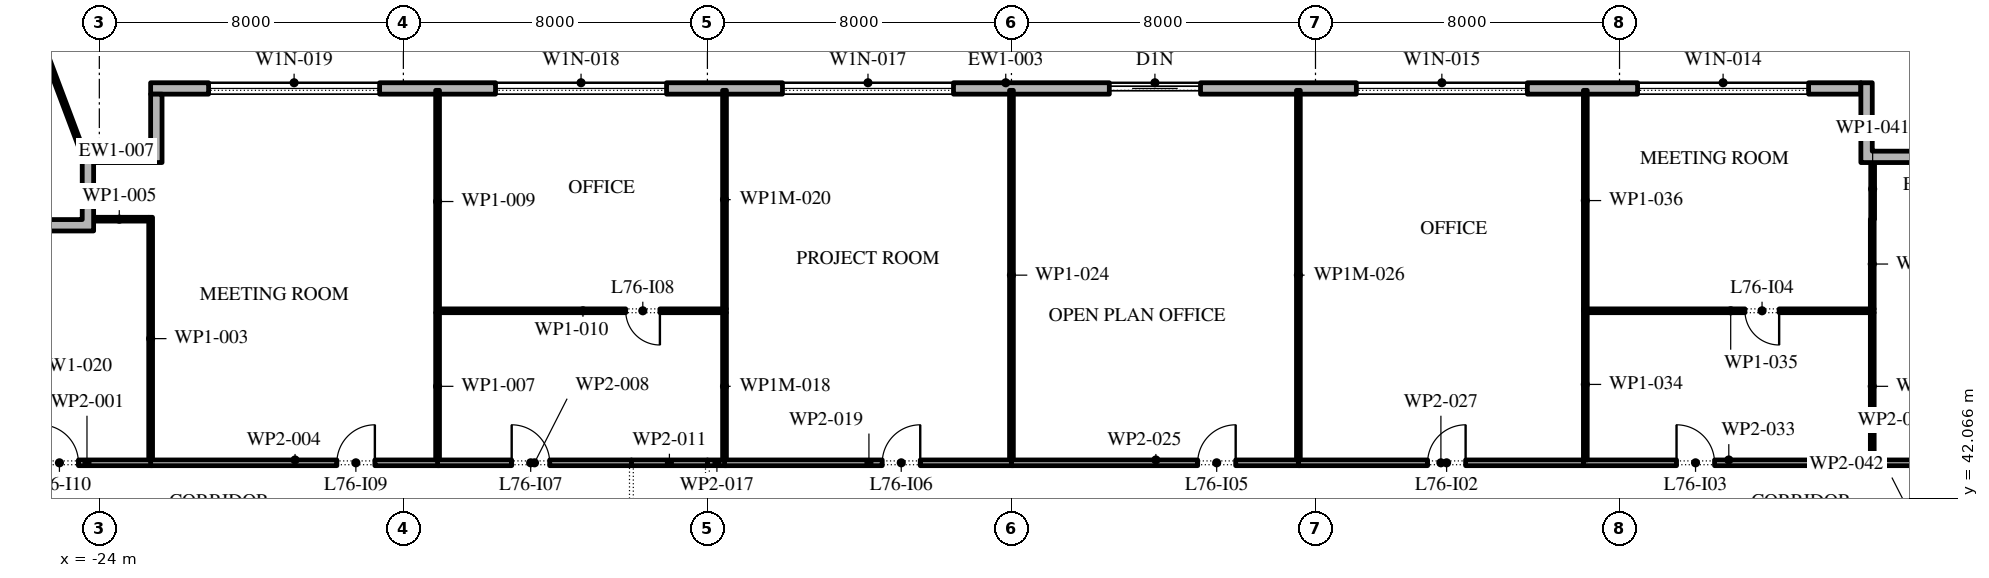
"""IFC4 building model, lengths in metres.
Left out: names, types, materials, properties, quantities, classifications, styles, units other than length and angle.
Written with IfcOpenShell. Run it as: python <this file> out.ifc"""

import sys

from ifc_helpers import new_model, si_unit, direction, frame, frame_2d, origin, place, context, subcontext, project, spatial, polyline, rectangle, outline, extrude, element, fill, save


model = new_model("IFC4")
c1 = context("Model", 3, precision=1e-05, world=origin(), true_north=direction((0.0, 1.0)))
c2 = subcontext(c1, "Body", "Model", "MODEL_VIEW")
j1 = project(units=[si_unit("LENGTHUNIT", "METRE"), si_unit("PLANEANGLEUNIT", "RADIAN")], contexts=[c1])
p1 = place(None, origin())
s1 = spatial("IfcSite", under=j1, at=p1, CompositionType="ELEMENT")
p2 = place(p1, origin())
s2 = spatial("IfcBuilding", under=s1, at=p2, CompositionType="ELEMENT")
p3 = place(p2, frame((0.0, 0.0, 346.8)))
s3 = spatial("IfcBuildingStorey", under=s2, at=p3, CompositionType="ELEMENT", Elevation=346.8)
p4 = place(p3, frame((22.35, 52.85, 0.0), z_axis=(0.0, 0.0, 1.0), x_axis=(-1.0, 0.0, 0.0)))
e1 = element("IfcWall", 1, at=p4, inside=s3, PredefinedType="STANDARD", context=c2, shape_type="SweptSolid", body=[
    extrude(rectangle(XDim=45.0, YDim=0.3, at=frame_2d((22.5, 0.0))), origin(), (0.0, 0.0, 1.0), 4.0),
])
p5 = place(p4, frame((1.375, 0.0, 0.45)))
e2 = element("IfcOpeningElement", 2, at=p5, cuts=e1, PredefinedType="OPENING", context=c2, shape_type="SweptSolid", body=[
    extrude(rectangle(XDim=4.5, YDim=2.525, at=frame_2d((2.25, 1.262))), frame((0.0, 0.16, 0.0), z_axis=(0.0, -1.0, 0.0), x_axis=(1.0, 0.0, 0.0)), (0.0, 0.0, 1.0), 0.32),
])
p6 = place(p4, frame((8.775, 0.0, 0.45)))
e3 = element("IfcOpeningElement", 3, at=p6, cuts=e1, PredefinedType="OPENING", context=c2, shape_type="SweptSolid", body=[
    extrude(rectangle(XDim=4.5, YDim=2.525, at=frame_2d((2.25, 1.262))), frame((0.0, 0.16, 0.0), z_axis=(0.0, -1.0, 0.0), x_axis=(1.0, 0.0, 0.0)), (0.0, 0.0, 1.0), 0.32),
])
p7 = place(p4, frame((17.375, 0.0, 0.0)))
e4 = element("IfcOpeningElement", 4, at=p7, cuts=e1, PredefinedType="OPENING", context=c2, shape_type="SweptSolid", body=[
    extrude(rectangle(XDim=2.4, YDim=2.975, at=frame_2d((1.2, 1.488))), frame((0.0, 0.16, 0.0), z_axis=(0.0, -1.0, 0.0), x_axis=(1.0, 0.0, 0.0)), (0.0, 0.0, 1.0), 0.32),
])
p8 = place(p4, frame((23.875, 0.0, 0.45)))
e5 = element("IfcOpeningElement", 5, at=p8, cuts=e1, PredefinedType="OPENING", context=c2, shape_type="SweptSolid", body=[
    extrude(rectangle(XDim=4.5, YDim=2.525, at=frame_2d((2.25, 1.262))), frame((0.0, 0.16, 0.0), z_axis=(0.0, -1.0, 0.0), x_axis=(1.0, 0.0, 0.0)), (0.0, 0.0, 1.0), 0.32),
])
p9 = place(p4, frame((31.425, 0.0, 0.45)))
e6 = element("IfcOpeningElement", 6, at=p9, cuts=e1, PredefinedType="OPENING", context=c2, shape_type="SweptSolid", body=[
    extrude(rectangle(XDim=4.5, YDim=2.525, at=frame_2d((2.25, 1.262))), frame((0.0, 0.16, 0.0), z_axis=(0.0, -1.0, 0.0), x_axis=(1.0, 0.0, 0.0)), (0.0, 0.0, 1.0), 0.32),
])
p10 = place(p4, frame((38.975, 0.0, 0.45)))
e7 = element("IfcOpeningElement", 7, at=p10, cuts=e1, PredefinedType="OPENING", context=c2, shape_type="SweptSolid", body=[
    extrude(rectangle(XDim=4.5, YDim=2.525, at=frame_2d((2.25, 1.262))), frame((0.0, 0.16, 0.0), z_axis=(0.0, -1.0, 0.0), x_axis=(1.0, 0.0, 0.0)), (0.0, 0.0, 1.0), 0.32),
])
p11 = place(p3, origin())
e8 = element("IfcWall", 8, at=p11, inside=s3, PredefinedType="STANDARD", context=c2, shape_type="SweptSolid", body=[
    extrude(outline(polyline([(24.15, 50.9), (22.35, 50.9), (22.35, 53.0), (22.65, 53.0), (22.65, 51.2), (24.45, 51.2), (24.45, 49.4), (25.95, 49.4), (25.95, 49.1), (24.15, 49.1), (24.15, 50.9)])), origin(), (0.0, 0.0, 1.0), 4.0),
])
p12 = place(p3, origin())
e9 = element("IfcWall", 9, at=p12, inside=s3, PredefinedType="STANDARD", context=c2, shape_type="SweptSolid", body=[
    extrude(outline(polyline([(-24.45, 49.4), (-24.45, 51.2), (-22.65, 51.2), (-22.65, 52.7), (-22.35, 52.7), (-22.35, 50.9), (-24.15, 50.9), (-24.15, 49.1), (-26.25, 49.1), (-26.25, 49.4), (-24.45, 49.4)])), origin(), (0.0, 0.0, 1.0), 4.0),
])
p13 = place(p3, frame((-24.45, 51.2, -0.05), z_axis=(0.0, 0.0, 1.0), x_axis=(-0.352001800812, 0.93599932277, 0.0)))
e10 = element("IfcWall", 10, at=p13, inside=s3, PredefinedType="STANDARD", context=c2, shape_type="SweptSolid", body=[
    extrude(rectangle(XDim=6.091, YDim=0.1, at=frame_2d((3.045, 0.0))), origin(), (0.0, 0.0, 1.0), 4.05),
])
p14 = place(p3, frame((-26.05, 43.0, 0.0), z_axis=(0.0, 0.0, 1.0), x_axis=(1.0, 0.0, 0.0)))
e11 = element("IfcWall", 11, at=p14, inside=s3, PredefinedType="PARTITIONING", context=c2, shape_type="SweptSolid", body=[
    extrude(rectangle(XDim=3.45, YDim=0.15, at=frame_2d((1.725, 0.0))), origin(), (0.0, 0.0, 1.0), 4.0),
])
p15 = place(p14, frame((0.5, 0.0, 0.0)))
e12 = element("IfcOpeningElement", 12, at=p15, cuts=e11, PredefinedType="OPENING", context=c2, shape_type="SweptSolid", body=[
    extrude(rectangle(XDim=1.0, YDim=2.1, at=frame_2d((0.5, 1.05))), frame((0.0, 0.085, 0.0), z_axis=(0.0, -1.0, 0.0), x_axis=(1.0, 0.0, 0.0)), (0.0, 0.0, 1.0), 0.17),
])
p16 = place(p3, frame((-22.65, 43.075, 0.0), z_axis=(0.0, 0.0, 1.0), x_axis=(0.0, 1.0, 0.0)))
e13 = element("IfcWall", 13, at=p16, inside=s3, PredefinedType="PARTITIONING", context=c2, shape_type="SweptSolid", body=[
    extrude(rectangle(XDim=6.385, YDim=0.1, at=frame_2d((3.192, 0.0))), origin(), (0.0, 0.0, 1.0), 4.0),
])
p17 = place(p3, frame((-22.65, 43.0, 0.0), z_axis=(0.0, 0.0, 1.0), x_axis=(1.0, 0.0, 0.0)))
e14 = element("IfcWall", 14, at=p17, inside=s3, PredefinedType="PARTITIONING", context=c2, shape_type="SweptSolid", body=[
    extrude(rectangle(XDim=7.6, YDim=0.15, at=frame_2d((3.8, 0.0))), origin(), (0.0, 0.0, 1.0), 4.0),
])
p18 = place(p17, frame((4.9, 0.0, 0.0)))
e15 = element("IfcOpeningElement", 15, at=p18, cuts=e14, PredefinedType="OPENING", context=c2, shape_type="SweptSolid", body=[
    extrude(rectangle(XDim=1.0, YDim=2.1, at=frame_2d((0.5, 1.05))), frame((0.0, 0.085, 0.0), z_axis=(0.0, -1.0, 0.0), x_axis=(1.0, 0.0, 0.0)), (0.0, 0.0, 1.0), 0.17),
])
p19 = place(p3, frame((-22.7, 49.41, 0.0), z_axis=(0.0, 0.0, 1.0), x_axis=(-1.0, 0.0, 0.0)))
e16 = element("IfcWall", 16, at=p19, inside=s3, PredefinedType="PARTITIONING", context=c2, shape_type="SweptSolid", body=[
    extrude(rectangle(XDim=1.55, YDim=0.1, at=frame_2d((0.775, 0.0))), origin(), (0.0, 0.0, 1.0), 4.0),
])
p20 = place(p3, frame((-15.1, 43.075, 0.0), z_axis=(0.0, 0.0, 1.0), x_axis=(0.0, 1.0, 0.0)))
e17 = element("IfcWall", 17, at=p20, inside=s3, PredefinedType="PARTITIONING", context=c2, shape_type="SweptSolid", body=[
    extrude(rectangle(XDim=3.875, YDim=0.1, at=frame_2d((1.938, 0.0))), origin(), (0.0, 0.0, 1.0), 4.0),
])
p21 = place(p3, frame((-15.1, 43.0, 0.0), z_axis=(0.0, 0.0, 1.0), x_axis=(1.0, 0.0, 0.0)))
e18 = element("IfcWall", 18, at=p21, inside=s3, PredefinedType="PARTITIONING", context=c2, shape_type="SweptSolid", body=[
    extrude(rectangle(XDim=5.1, YDim=0.15, at=frame_2d((2.55, 0.0))), origin(), (0.0, 0.0, 1.0), 4.0),
])
p22 = place(p21, frame((1.95, 0.0, 0.0)))
e19 = element("IfcOpeningElement", 19, at=p22, cuts=e18, PredefinedType="OPENING", context=c2, shape_type="SweptSolid", body=[
    extrude(rectangle(XDim=1.0, YDim=2.1, at=frame_2d((0.5, 1.05))), frame((0.0, 0.085, 0.0), z_axis=(0.0, -1.0, 0.0), x_axis=(1.0, 0.0, 0.0)), (0.0, 0.0, 1.0), 0.17),
])
p23 = place(p3, frame((-15.1, 46.95, 0.0), z_axis=(0.0, 0.0, 1.0), x_axis=(0.0, 1.0, 0.0)))
e20 = element("IfcWall", 20, at=p23, inside=s3, PredefinedType="PARTITIONING", context=c2, shape_type="SweptSolid", body=[
    extrude(rectangle(XDim=5.85, YDim=0.1, at=frame_2d((2.925, 0.0))), origin(), (0.0, 0.0, 1.0), 4.0),
])
p24 = place(p3, frame((-15.05, 47.0, 0.0), z_axis=(0.0, 0.0, 1.0), x_axis=(1.0, 0.0, 0.0)))
e21 = element("IfcWall", 21, at=p24, inside=s3, PredefinedType="PARTITIONING", context=c2, shape_type="SweptSolid", body=[
    extrude(rectangle(XDim=7.55, YDim=0.1, at=frame_2d((3.775, 0.0))), origin(), (0.0, 0.0, 1.0), 4.0),
])
p25 = place(p24, frame((4.9, 0.0, 0.0)))
e22 = element("IfcOpeningElement", 22, at=p25, cuts=e21, PredefinedType="OPENING", context=c2, shape_type="SweptSolid", body=[
    extrude(rectangle(XDim=0.9, YDim=2.1, at=frame_2d((0.45, 1.05))), frame((0.0, 0.06, 0.0), z_axis=(0.0, -1.0, 0.0), x_axis=(1.0, 0.0, 0.0)), (0.0, 0.0, 1.0), 0.12),
])
p26 = place(p3, frame((-10.0, 43.0, 0.0), z_axis=(0.0, 0.0, 1.0), x_axis=(1.0, 0.0, 0.0)))
e23 = element("IfcWall", 23, at=p26, inside=s3, PredefinedType="PARTITIONING", context=c2, shape_type="SweptSolid", body=[
    extrude(rectangle(XDim=2.0, YDim=0.15, at=frame_2d((1.0, 0.0))), origin(), (0.0, 0.0, 1.0), 4.0),
])
p27 = place(p3, frame((-8.0, 43.0, 0.0), z_axis=(0.0, 0.0, 1.0), x_axis=(1.0, 0.0, 0.0)))
e24 = element("IfcWall", 24, at=p27, inside=s3, PredefinedType="PARTITIONING", context=c2, shape_type="SweptSolid", body=[
    extrude(rectangle(XDim=0.5, YDim=0.15, at=frame_2d((0.25, 0.0))), origin(), (0.0, 0.0, 1.0), 4.0),
])
p28 = place(p3, frame((-7.55, 43.075, 0.0), z_axis=(0.0, 0.0, 1.0), x_axis=(0.0, 1.0, 0.0)))
e25 = element("IfcWall", 25, at=p28, inside=s3, PredefinedType="PARTITIONING", context=c2, shape_type="SweptSolid", body=[
    extrude(rectangle(XDim=3.875, YDim=0.1, at=frame_2d((1.938, 0.0))), origin(), (0.0, 0.0, 1.0), 3.096),
])
p29 = place(p3, frame((-7.55, 43.0, 0.0), z_axis=(0.0, 0.0, 1.0), x_axis=(1.0, 0.0, 0.0)))
e26 = element("IfcWall", 26, at=p29, inside=s3, PredefinedType="PARTITIONING", context=c2, shape_type="SweptSolid", body=[
    extrude(rectangle(XDim=7.6, YDim=0.15, at=frame_2d((3.8, 0.0))), origin(), (0.0, 0.0, 1.0), 4.0),
])
p30 = place(p29, frame((4.15, 0.0, 0.0)))
e27 = element("IfcOpeningElement", 27, at=p30, cuts=e26, PredefinedType="OPENING", context=c2, shape_type="SweptSolid", body=[
    extrude(rectangle(XDim=1.0, YDim=2.1, at=frame_2d((0.5, 1.05))), frame((0.0, 0.085, 0.0), z_axis=(0.0, -1.0, 0.0), x_axis=(1.0, 0.0, 0.0)), (0.0, 0.0, 1.0), 0.17),
])
p31 = place(p3, frame((-7.55, 47.05, 0.0), z_axis=(0.0, 0.0, 1.0), x_axis=(0.0, 1.0, 0.0)))
e28 = element("IfcWall", 28, at=p31, inside=s3, PredefinedType="PARTITIONING", context=c2, shape_type="SweptSolid", body=[
    extrude(rectangle(XDim=5.75, YDim=0.1, at=frame_2d((2.875, 0.0))), origin(), (0.0, 0.0, 1.0), 3.096),
])
p32 = place(p3, frame((0.0, 43.075, 0.0), z_axis=(0.0, 0.0, 1.0), x_axis=(0.0, 1.0, 0.0)))
e29 = element("IfcWall", 29, at=p32, inside=s3, PredefinedType="PARTITIONING", context=c2, shape_type="SweptSolid", body=[
    extrude(rectangle(XDim=9.725, YDim=0.1, at=frame_2d((4.863, 0.0))), origin(), (0.0, 0.0, 1.0), 4.0),
])
p33 = place(p3, frame((0.0, 43.0, 0.0), z_axis=(0.0, 0.0, 1.0), x_axis=(1.0, 0.0, 0.0)))
e30 = element("IfcWall", 30, at=p33, inside=s3, PredefinedType="PARTITIONING", context=c2, shape_type="SweptSolid", body=[
    extrude(rectangle(XDim=7.6, YDim=0.15, at=frame_2d((3.8, 0.0))), origin(), (0.0, 0.0, 1.0), 4.0),
])
p34 = place(p33, frame((4.9, 0.0, 0.0)))
e31 = element("IfcOpeningElement", 31, at=p34, cuts=e30, PredefinedType="OPENING", context=c2, shape_type="SweptSolid", body=[
    extrude(rectangle(XDim=1.0, YDim=2.1, at=frame_2d((0.5, 1.05))), frame((0.0, 0.085, 0.0), z_axis=(0.0, -1.0, 0.0), x_axis=(1.0, 0.0, 0.0)), (0.0, 0.0, 1.0), 0.17),
])
p35 = place(p3, frame((7.55, 43.075, 0.0), z_axis=(0.0, 0.0, 1.0), x_axis=(0.0, 1.0, 0.0)))
e32 = element("IfcWall", 32, at=p35, inside=s3, PredefinedType="PARTITIONING", context=c2, shape_type="SweptSolid", body=[
    extrude(rectangle(XDim=9.725, YDim=0.1, at=frame_2d((4.863, 0.0))), origin(), (0.0, 0.0, 1.0), 3.096),
])
p36 = place(p3, frame((7.55, 43.0, 0.0), z_axis=(0.0, 0.0, 1.0), x_axis=(1.0, 0.0, 0.0)))
e33 = element("IfcWall", 33, at=p36, inside=s3, PredefinedType="PARTITIONING", context=c2, shape_type="SweptSolid", body=[
    extrude(rectangle(XDim=7.5, YDim=0.15, at=frame_2d((3.75, 0.0))), origin(), (0.0, 0.0, 1.0), 4.0),
])
p37 = place(p36, frame((3.4, 0.0, 0.0)))
e34 = element("IfcOpeningElement", 34, at=p37, cuts=e33, PredefinedType="OPENING", context=c2, shape_type="SweptSolid", body=[
    extrude(rectangle(XDim=1.0, YDim=2.1, at=frame_2d((0.5, 1.05))), frame((0.0, 0.085, 0.0), z_axis=(0.0, -1.0, 0.0), x_axis=(1.0, 0.0, 0.0)), (0.0, 0.0, 1.0), 0.17),
])
p38 = place(p3, frame((15.05, 43.0, 0.0), z_axis=(0.0, 0.0, 1.0), x_axis=(1.0, 0.0, 0.0)))
e35 = element("IfcWall", 35, at=p38, inside=s3, PredefinedType="PARTITIONING", context=c2, shape_type="SweptSolid", body=[
    extrude(rectangle(XDim=7.65, YDim=0.15, at=frame_2d((3.825, 0.0))), origin(), (0.0, 0.0, 1.0), 4.0),
])
p39 = place(p38, frame((2.45, 0.0, 0.0)))
e36 = element("IfcOpeningElement", 36, at=p39, cuts=e35, PredefinedType="OPENING", context=c2, shape_type="SweptSolid", body=[
    extrude(rectangle(XDim=1.0, YDim=2.1, at=frame_2d((0.5, 1.05))), frame((0.0, 0.085, 0.0), z_axis=(0.0, -1.0, 0.0), x_axis=(1.0, 0.0, 0.0)), (0.0, 0.0, 1.0), 0.17),
])
p40 = place(p3, frame((15.1, 47.05, 0.0), z_axis=(0.0, 0.0, 1.0), x_axis=(0.0, -1.0, 0.0)))
e37 = element("IfcWall", 37, at=p40, inside=s3, PredefinedType="PARTITIONING", context=c2, shape_type="SweptSolid", body=[
    extrude(rectangle(XDim=3.975, YDim=0.1, at=frame_2d((1.988, 0.0))), origin(), (0.0, 0.0, 1.0), 4.0),
])
p41 = place(p3, frame((15.15, 47.0, 0.0), z_axis=(0.0, 0.0, 1.0), x_axis=(1.0, 0.0, 0.0)))
e38 = element("IfcWall", 38, at=p41, inside=s3, PredefinedType="PARTITIONING", context=c2, shape_type="SweptSolid", body=[
    extrude(rectangle(XDim=7.55, YDim=0.1, at=frame_2d((3.775, 0.0))), origin(), (0.0, 0.0, 1.0), 4.0),
])
p42 = place(p41, frame((4.15, 0.0, 0.0)))
e39 = element("IfcOpeningElement", 39, at=p42, cuts=e38, PredefinedType="OPENING", context=c2, shape_type="SweptSolid", body=[
    extrude(rectangle(XDim=0.9, YDim=2.1, at=frame_2d((0.45, 1.05))), frame((0.0, 0.06, 0.0), z_axis=(0.0, -1.0, 0.0), x_axis=(1.0, 0.0, 0.0)), (0.0, 0.0, 1.0), 0.12),
])
p43 = place(p3, frame((15.1, 52.8, 0.0), z_axis=(0.0, 0.0, 1.0), x_axis=(0.0, -1.0, 0.0)))
e40 = element("IfcWall", 40, at=p43, inside=s3, PredefinedType="PARTITIONING", context=c2, shape_type="SweptSolid", body=[
    extrude(rectangle(XDim=5.8, YDim=0.1, at=frame_2d((2.9, 0.0))), origin(), (0.0, 0.0, 1.0), 4.0),
])
p44 = place(p3, frame((22.65, 43.075, 0.0), z_axis=(0.0, 0.0, 1.0), x_axis=(0.0, 1.0, 0.0)))
e41 = element("IfcWall", 41, at=p44, inside=s3, PredefinedType="PARTITIONING", context=c2, shape_type="SweptSolid", body=[
    extrude(rectangle(XDim=3.875, YDim=0.1, at=frame_2d((1.938, 0.0))), origin(), (0.0, 0.0, 1.0), 4.0),
])
p45 = place(p3, frame((22.7, 43.0, 0.0), z_axis=(0.0, 0.0, 1.0), x_axis=(1.0, 0.0, 0.0)))
e42 = element("IfcWall", 42, at=p45, inside=s3, PredefinedType="PARTITIONING", context=c2, shape_type="SweptSolid", body=[
    extrude(rectangle(XDim=3.35, YDim=0.15, at=frame_2d((1.675, 0.0))), origin(), (0.0, 0.0, 1.0), 4.0),
])
p46 = place(p45, frame((1.65, 0.0, 0.0)))
e43 = element("IfcOpeningElement", 43, at=p46, cuts=e42, PredefinedType="OPENING", context=c2, shape_type="SweptSolid", body=[
    extrude(rectangle(XDim=1.0, YDim=2.1, at=frame_2d((0.5, 1.05))), frame((0.0, 0.085, 0.0), z_axis=(0.0, -1.0, 0.0), x_axis=(1.0, 0.0, 0.0)), (0.0, 0.0, 1.0), 0.17),
])
p47 = place(p3, frame((22.65, 47.05, 0.0), z_axis=(0.0, 0.0, 1.0), x_axis=(0.0, 1.0, 0.0)))
e44 = element("IfcWall", 44, at=p47, inside=s3, PredefinedType="PARTITIONING", context=c2, shape_type="SweptSolid", body=[
    extrude(rectangle(XDim=2.36, YDim=0.1, at=frame_2d((1.18, 0.0))), origin(), (0.0, 0.0, 1.0), 4.0),
])
p48 = place(p3, frame((22.66, 49.41, 0.0), z_axis=(0.0, 0.0, 1.0), x_axis=(0.0, 1.0, 0.0)))
e45 = element("IfcWall", 45, at=p48, inside=s3, PredefinedType="PARTITIONING", context=c2, shape_type="SweptSolid", body=[
    extrude(rectangle(XDim=1.59, YDim=0.1, at=frame_2d((0.795, 0.0))), origin(), (0.0, 0.0, 1.0), 4.0),
])
p49 = place(p5, origin())
e46 = element("IfcWindow", 46, at=p49, inside=s3, PartitioningType="DOUBLE_PANEL_VERTICAL", PredefinedType="WINDOW", context=c2, shape_type="SweptSolid", body=[
    extrude(rectangle(XDim=4.5, YDim=2.525, at=frame_2d((2.25, 1.262))), frame((0.0, 0.03, 0.0), z_axis=(0.0, -1.0, 0.0), x_axis=(1.0, 0.0, 0.0)), (0.0, 0.0, 1.0), 0.06),
])
fill(e2, e46)
p50 = place(p6, origin())
e47 = element("IfcWindow", 47, at=p50, inside=s3, PartitioningType="DOUBLE_PANEL_VERTICAL", PredefinedType="WINDOW", context=c2, shape_type="SweptSolid", body=[
    extrude(rectangle(XDim=4.5, YDim=2.525, at=frame_2d((2.25, 1.262))), frame((0.0, 0.03, 0.0), z_axis=(0.0, -1.0, 0.0), x_axis=(1.0, 0.0, 0.0)), (0.0, 0.0, 1.0), 0.06),
])
fill(e3, e47)
p51 = place(p7, origin())
e48 = element("IfcDoor", 48, at=p51, inside=s3, OperationType="DOUBLE_DOOR_SLIDING", PredefinedType="DOOR", context=c2, shape_type="SweptSolid", body=[
    extrude(rectangle(XDim=2.4, YDim=2.975, at=frame_2d((1.2, 1.488))), frame((0.0, 0.025, 0.0), z_axis=(0.0, -1.0, 0.0), x_axis=(1.0, 0.0, 0.0)), (0.0, 0.0, 1.0), 0.05),
])
fill(e4, e48)
p52 = place(p8, origin())
e49 = element("IfcWindow", 49, at=p52, inside=s3, PartitioningType="DOUBLE_PANEL_VERTICAL", PredefinedType="WINDOW", context=c2, shape_type="SweptSolid", body=[
    extrude(rectangle(XDim=4.5, YDim=2.525, at=frame_2d((2.25, 1.262))), frame((0.0, 0.03, 0.0), z_axis=(0.0, -1.0, 0.0), x_axis=(1.0, 0.0, 0.0)), (0.0, 0.0, 1.0), 0.06),
])
fill(e5, e49)
p53 = place(p9, origin())
e50 = element("IfcWindow", 50, at=p53, inside=s3, PartitioningType="DOUBLE_PANEL_VERTICAL", PredefinedType="WINDOW", context=c2, shape_type="SweptSolid", body=[
    extrude(rectangle(XDim=4.5, YDim=2.525, at=frame_2d((2.25, 1.262))), frame((0.0, 0.03, 0.0), z_axis=(0.0, -1.0, 0.0), x_axis=(1.0, 0.0, 0.0)), (0.0, 0.0, 1.0), 0.06),
])
fill(e6, e50)
p54 = place(p10, origin())
e51 = element("IfcWindow", 51, at=p54, inside=s3, PartitioningType="DOUBLE_PANEL_VERTICAL", PredefinedType="WINDOW", context=c2, shape_type="SweptSolid", body=[
    extrude(rectangle(XDim=4.5, YDim=2.525, at=frame_2d((2.25, 1.262))), frame((0.0, 0.03, 0.0), z_axis=(0.0, -1.0, 0.0), x_axis=(1.0, 0.0, 0.0)), (0.0, 0.0, 1.0), 0.06),
])
fill(e7, e51)
p55 = place(p37, origin())
e52 = element("IfcDoor", 52, at=p55, inside=s3, OperationType="SINGLE_SWING_LEFT", PredefinedType="DOOR", context=c2, shape_type="SweptSolid", body=[
    extrude(rectangle(XDim=1.0, YDim=2.1, at=frame_2d((0.5, 1.05))), frame((0.0, 0.025, 0.0), z_axis=(0.0, -1.0, 0.0), x_axis=(1.0, 0.0, 0.0)), (0.0, 0.0, 1.0), 0.05),
])
fill(e34, e52)
p56 = place(p39, origin())
e53 = element("IfcDoor", 53, at=p56, inside=s3, OperationType="SINGLE_SWING_RIGHT", PredefinedType="DOOR", context=c2, shape_type="SweptSolid", body=[
    extrude(rectangle(XDim=1.0, YDim=2.1, at=frame_2d((0.5, 1.05))), frame((0.0, 0.025, 0.0), z_axis=(0.0, -1.0, 0.0), x_axis=(1.0, 0.0, 0.0)), (0.0, 0.0, 1.0), 0.05),
])
fill(e36, e53)
p57 = place(p42, frame((0.9, 0.0, 0.0), z_axis=(0.0, 0.0, 1.0), x_axis=(-1.0, 0.0, 0.0)))
e54 = element("IfcDoor", 54, at=p57, inside=s3, OperationType="SINGLE_SWING_RIGHT", PredefinedType="DOOR", context=c2, shape_type="SweptSolid", body=[
    extrude(rectangle(XDim=0.9, YDim=2.1, at=frame_2d((0.45, 1.05))), frame((0.0, 0.025, 0.0), z_axis=(0.0, -1.0, 0.0), x_axis=(1.0, 0.0, 0.0)), (0.0, 0.0, 1.0), 0.05),
])
fill(e39, e54)
p58 = place(p34, origin())
e55 = element("IfcDoor", 55, at=p58, inside=s3, OperationType="SINGLE_SWING_LEFT", PredefinedType="DOOR", context=c2, shape_type="SweptSolid", body=[
    extrude(rectangle(XDim=1.0, YDim=2.1, at=frame_2d((0.5, 1.05))), frame((0.0, 0.025, 0.0), z_axis=(0.0, -1.0, 0.0), x_axis=(1.0, 0.0, 0.0)), (0.0, 0.0, 1.0), 0.05),
])
fill(e31, e55)
p59 = place(p30, origin())
e56 = element("IfcDoor", 56, at=p59, inside=s3, OperationType="SINGLE_SWING_LEFT", PredefinedType="DOOR", context=c2, shape_type="SweptSolid", body=[
    extrude(rectangle(XDim=1.0, YDim=2.1, at=frame_2d((0.5, 1.05))), frame((0.0, 0.025, 0.0), z_axis=(0.0, -1.0, 0.0), x_axis=(1.0, 0.0, 0.0)), (0.0, 0.0, 1.0), 0.05),
])
fill(e27, e56)
p60 = place(p22, origin())
e57 = element("IfcDoor", 57, at=p60, inside=s3, OperationType="SINGLE_SWING_RIGHT", PredefinedType="DOOR", context=c2, shape_type="SweptSolid", body=[
    extrude(rectangle(XDim=1.0, YDim=2.1, at=frame_2d((0.5, 1.05))), frame((0.0, 0.025, 0.0), z_axis=(0.0, -1.0, 0.0), x_axis=(1.0, 0.0, 0.0)), (0.0, 0.0, 1.0), 0.05),
])
fill(e19, e57)
p61 = place(p25, frame((0.9, 0.0, 0.0), z_axis=(0.0, 0.0, 1.0), x_axis=(-1.0, 0.0, 0.0)))
e58 = element("IfcDoor", 58, at=p61, inside=s3, OperationType="SINGLE_SWING_RIGHT", PredefinedType="DOOR", context=c2, shape_type="SweptSolid", body=[
    extrude(rectangle(XDim=0.9, YDim=2.1, at=frame_2d((0.45, 1.05))), frame((0.0, 0.025, 0.0), z_axis=(0.0, -1.0, 0.0), x_axis=(1.0, 0.0, 0.0)), (0.0, 0.0, 1.0), 0.05),
])
fill(e22, e58)
p62 = place(p18, origin())
e59 = element("IfcDoor", 59, at=p62, inside=s3, OperationType="SINGLE_SWING_LEFT", PredefinedType="DOOR", context=c2, shape_type="SweptSolid", body=[
    extrude(rectangle(XDim=1.0, YDim=2.1, at=frame_2d((0.5, 1.05))), frame((0.0, 0.025, 0.0), z_axis=(0.0, -1.0, 0.0), x_axis=(1.0, 0.0, 0.0)), (0.0, 0.0, 1.0), 0.05),
])
fill(e15, e59)
p63 = place(p15, origin())
e60 = element("IfcDoor", 60, at=p63, inside=s3, OperationType="SINGLE_SWING_RIGHT", PredefinedType="DOOR", context=c2, shape_type="SweptSolid", body=[
    extrude(rectangle(XDim=1.0, YDim=2.1, at=frame_2d((0.5, 1.05))), frame((0.0, 0.025, 0.0), z_axis=(0.0, -1.0, 0.0), x_axis=(1.0, 0.0, 0.0)), (0.0, 0.0, 1.0), 0.05),
])
fill(e12, e60)
save(model, sys.argv[1])
